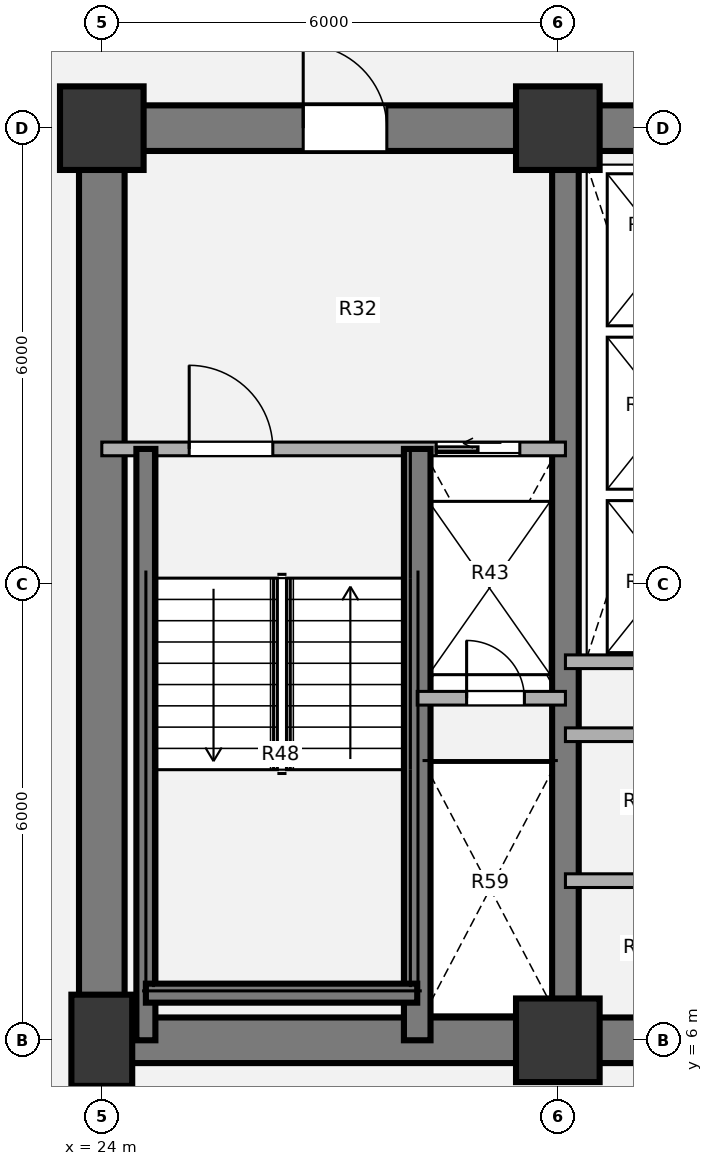
"""IFC4 building model, lengths in metres.
Left out: names, types, materials, properties, quantities, classifications, styles, units other than length and angle.
Written with IfcOpenShell. Run it as: python <this file> out.ifc"""

import sys

from ifc_helpers import new_model, si_unit, direction, frame, frame_2d, origin, origin_2d, place, context, subcontext, project, spatial, rectangle, extrude, source, transform, mapped, element, fill, save


model = new_model("IFC4")
c1 = context("Model", 3, precision=1e-05, world=origin(), true_north=direction((0.0, 1.0)))
c2 = subcontext(c1, "Body", "Model", "MODEL_VIEW")
j1 = project(units=[si_unit("LENGTHUNIT", "METRE"), si_unit("PLANEANGLEUNIT", "RADIAN")], contexts=[c1])
p1 = place(None, origin())
s1 = spatial("IfcSite", under=j1, at=p1, CompositionType="ELEMENT")
p2 = place(p1, origin())
s2 = spatial("IfcBuilding", under=s1, at=p2, CompositionType="ELEMENT")
p3 = place(p2, frame((0.0, 0.0, 68.58)))
s3 = spatial("IfcBuildingStorey", under=s2, at=p3, CompositionType="ELEMENT", Elevation=68.58)
m1 = source(origin(), c2, "Body", "SweptSolid", [
    extrude(rectangle(XDim=0.8, YDim=1.2, at=origin_2d()), origin(), (0.0, 0.0, 1.0), 3.78),
])
p4 = place(p3, frame((24.0, 6.0, 0.0), z_axis=(0.0, 0.0, 1.0), x_axis=(1.0, 0.0, 0.0)))
e1 = element("IfcColumn", 1, at=p4, inside=s3, PredefinedType="COLUMN", context=c2, shape_type="MappedRepresentation", body=[
    mapped(m1, transform((0.0, 0.0, 0.0), x_axis=(1.0, 0.0, 0.0), y_axis=(0.0, 1.0, 0.0), z_axis=(0.0, 0.0, 1.0), scale=1.0)),
])
m2 = source(origin(), c2, "Body", "SweptSolid", [
    extrude(rectangle(XDim=1.1, YDim=1.1, at=origin_2d()), origin(), (0.0, 0.0, 1.0), 3.78),
])
for number, where, z_axis, x_axis in (
    (2, (30.0, 6.0, 0.0), (0.0, 0.0, 1.0), (1.0, 0.0, 0.0)),
    (3, (24.0, 18.0, 0.0), (0.0, 0.0, 1.0), (1.0, 0.0, 0.0)),
    (4, (30.0, 18.0, 0.0), (0.0, 0.0, 1.0), (1.0, 0.0, 0.0)),
):
    element("IfcColumn", number, at=place(p3, frame(where, z_axis=z_axis, x_axis=x_axis)), inside=s3, PredefinedType="COLUMN", context=c2, shape_type="MappedRepresentation", body=[
        mapped(m2, transform((0.0, 0.0, 0.0), x_axis=(1.0, 0.0, 0.0), y_axis=(0.0, 1.0, 0.0), z_axis=(0.0, 0.0, 1.0), scale=1.0)),
    ])
p5 = place(p3, frame((48.3, 6.0, 0.0), z_axis=(0.0, 0.0, 1.0), x_axis=(-1.0, 0.0, 0.0)))
e5 = element("IfcWall", 5, at=p5, inside=s3, PredefinedType="SHEAR", context=c2, shape_type="SweptSolid", body=[
    extrude(rectangle(XDim=24.6, YDim=0.6, at=frame_2d((12.3, 0.0))), origin(), (0.0, 0.0, 1.0), 3.78),
])
p6 = place(p3, frame((24.0, 6.0, 0.0), z_axis=(0.0, 0.0, 1.0), x_axis=(0.0, 1.0, 0.0)))
e6 = element("IfcWall", 6, at=p6, inside=s3, PredefinedType="SHEAR", context=c2, shape_type="SweptSolid", body=[
    extrude(rectangle(XDim=12.0, YDim=0.6, at=frame_2d((6.0, 0.0))), origin(), (0.0, 0.0, 1.0), 3.78),
])
p7 = place(p3, frame((23.7, 18.0, 0.0), z_axis=(0.0, 0.0, 1.0), x_axis=(1.0, 0.0, 0.0)))
e7 = element("IfcWall", 7, at=p7, inside=s3, PredefinedType="SHEAR", context=c2, shape_type="SweptSolid", body=[
    extrude(rectangle(XDim=9.5, YDim=0.6, at=frame_2d((4.75, 0.0))), origin(), (0.0, 0.0, 1.0), 3.78),
])
p8 = place(p7, frame((2.95, 0.0, 0.0)))
e8 = element("IfcOpeningElement", 8, at=p8, cuts=e7, PredefinedType="OPENING", context=c2, shape_type="SweptSolid", body=[
    extrude(rectangle(XDim=1.1, YDim=2.1, at=origin_2d()), frame((0.55, 0.31, 1.05), z_axis=(0.0, -1.0, 0.0), x_axis=(1.0, 0.0, 0.0)), (0.0, 0.0, 1.0), 0.62),
])
p9 = place(p3, frame((30.1, 6.0, 0.0), z_axis=(0.0, 0.0, 1.0), x_axis=(0.0, 1.0, 0.0)))
e9 = element("IfcWall", 9, at=p9, inside=s3, PredefinedType="SHEAR", context=c2, shape_type="SweptSolid", body=[
    extrude(rectangle(XDim=12.0, YDim=0.35, at=frame_2d((6.0, 0.0))), origin(), (0.0, 0.0, 1.0), 3.78),
])
for number, where, z_axis, x_axis in (
    (10, (30.1, 10.98, 0.0), (0.0, 0.0, 1.0), (1.0, 0.0, 0.0)),
    (11, (30.1, 8.1, 0.0), (0.0, 0.0, 1.0), (1.0, 0.0, 0.0)),
    (12, (30.1, 10.02, 0.0), (0.0, 0.0, 1.0), (1.0, 0.0, 0.0)),
):
    element("IfcWall", number, at=place(p3, frame(where, z_axis=z_axis, x_axis=x_axis)), inside=s3, PredefinedType="PARTITIONING", context=c2, shape_type="SweptSolid", body=[
        extrude(rectangle(XDim=2.5, YDim=0.18, at=frame_2d((1.25, 0.0))), origin(), (0.0, 0.0, 1.0), 3.5),
    ])
p10 = place(p3, frame((24.0, 13.78, 0.0), z_axis=(0.0, 0.0, 1.0), x_axis=(1.0, 0.0, 0.0)))
e13 = element("IfcWall", 13, at=p10, inside=s3, PredefinedType="PARTITIONING", context=c2, shape_type="SweptSolid", body=[
    extrude(rectangle(XDim=6.1, YDim=0.18, at=frame_2d((3.05, 0.0))), origin(), (0.0, 0.0, 1.0), 3.5),
])
p11 = place(p10, frame((1.15, 0.0, 0.0)))
e14 = element("IfcOpeningElement", 14, at=p11, cuts=e13, PredefinedType="OPENING", context=c2, shape_type="SweptSolid", body=[
    extrude(rectangle(XDim=1.1, YDim=2.1, at=origin_2d()), frame((0.55, 0.1, 1.05), z_axis=(0.0, -1.0, 0.0), x_axis=(1.0, 0.0, 0.0)), (0.0, 0.0, 1.0), 0.2),
])
p12 = place(p10, frame((4.4, 0.0, 0.0)))
e15 = element("IfcOpeningElement", 15, at=p12, cuts=e13, PredefinedType="OPENING", context=c2, shape_type="SweptSolid", body=[
    extrude(rectangle(XDim=1.1, YDim=2.1, at=origin_2d()), frame((0.55, 0.1, 1.05), z_axis=(0.0, -1.0, 0.0), x_axis=(1.0, 0.0, 0.0)), (0.0, 0.0, 1.0), 0.2),
])
p13 = place(p3, frame((28.15, 6.0, 0.0), z_axis=(0.0, 0.0, 1.0), x_axis=(0.0, 1.0, 0.0)))
e16 = element("IfcWall", 16, at=p13, inside=s3, PredefinedType="SHEAR", context=c2, shape_type="SweptSolid", body=[
    extrude(rectangle(XDim=7.78, YDim=0.35, at=frame_2d((3.89, 0.0))), origin(), (0.0, 0.0, 1.0), 3.85),
])
p14 = place(p3, frame((24.58, 6.0, 0.0), z_axis=(0.0, 0.0, 1.0), x_axis=(0.0, 1.0, 0.0)))
e17 = element("IfcWall", 17, at=p14, inside=s3, PredefinedType="SHEAR", context=c2, shape_type="SweptSolid", body=[
    extrude(rectangle(XDim=7.78, YDim=0.25, at=frame_2d((3.89, 0.0))), origin(), (0.0, 0.0, 1.0), 3.85),
])
p15 = place(p3, frame((24.58, 6.62, 0.0), z_axis=(0.0, 0.0, 1.0), x_axis=(1.0, 0.0, 0.0)))
e18 = element("IfcWall", 18, at=p15, inside=s3, PredefinedType="SHEAR", context=c2, shape_type="SweptSolid", body=[
    extrude(rectangle(XDim=3.57, YDim=0.25, at=frame_2d((1.785, 0.0))), origin(), (0.0, 0.0, 1.0), 3.85),
])
p16 = place(p3, frame((28.15, 10.5, 0.0), z_axis=(0.0, 0.0, 1.0), x_axis=(1.0, 0.0, 0.0)))
e19 = element("IfcWall", 19, at=p16, inside=s3, PredefinedType="PARTITIONING", context=c2, shape_type="SweptSolid", body=[
    extrude(rectangle(XDim=1.95, YDim=0.18, at=frame_2d((0.975, 0.0))), origin(), (0.0, 0.0, 1.0), 3.5),
])
p17 = place(p16, frame((0.65, 0.0, 0.0)))
e20 = element("IfcOpeningElement", 20, at=p17, cuts=e19, PredefinedType="OPENING", context=c2, shape_type="SweptSolid", body=[
    extrude(rectangle(XDim=0.76, YDim=2.05, at=origin_2d()), frame((0.38, 0.1, 1.025), z_axis=(0.0, -1.0, 0.0), x_axis=(1.0, 0.0, 0.0)), (0.0, 0.0, 1.0), 0.2),
])
m3 = source(origin(), c2, "Body", "SweptSolid", [
    extrude(rectangle(XDim=1.1, YDim=2.1, at=origin_2d()), frame((0.55, 0.025, 1.05), z_axis=(0.0, -1.0, 0.0), x_axis=(1.0, 0.0, 0.0)), (0.0, 0.0, 1.0), 0.05),
])
p18 = place(p11, origin())
e21 = element("IfcDoor", 21, at=p18, inside=s3, OperationType="SINGLE_SWING_LEFT", PredefinedType="DOOR", context=c2, shape_type="MappedRepresentation", body=[
    mapped(m3, transform((0.0, 0.0, 0.0), x_axis=(1.0, 0.0, 0.0), y_axis=(0.0, 1.0, 0.0), z_axis=(0.0, 0.0, 1.0), scale=1.0)),
])
fill(e14, e21)
m4 = source(origin(), c2, "Body", "SweptSolid", [
    extrude(rectangle(XDim=1.1, YDim=2.1, at=origin_2d()), frame((0.55, 0.025, 1.05), z_axis=(0.0, -1.0, 0.0), x_axis=(1.0, 0.0, 0.0)), (0.0, 0.0, 1.0), 0.05),
])
p19 = place(p12, origin())
e22 = element("IfcDoor", 22, at=p19, inside=s3, OperationType="SLIDING_TO_LEFT", PredefinedType="DOOR", context=c2, shape_type="MappedRepresentation", body=[
    mapped(m4, transform((0.0, 0.0, 0.0), x_axis=(1.0, 0.0, 0.0), y_axis=(0.0, 1.0, 0.0), z_axis=(0.0, 0.0, 1.0), scale=1.0)),
])
fill(e15, e22)
m5 = source(origin(), c2, "Body", "SweptSolid", [
    extrude(rectangle(XDim=0.76, YDim=2.05, at=origin_2d()), frame((0.38, 0.025, 1.025), z_axis=(0.0, -1.0, 0.0), x_axis=(1.0, 0.0, 0.0)), (0.0, 0.0, 1.0), 0.05),
])
p20 = place(p17, origin())
e23 = element("IfcDoor", 23, at=p20, inside=s3, OperationType="SINGLE_SWING_LEFT", PredefinedType="DOOR", context=c2, shape_type="MappedRepresentation", body=[
    mapped(m5, transform((0.0, 0.0, 0.0), x_axis=(1.0, 0.0, 0.0), y_axis=(0.0, 1.0, 0.0), z_axis=(0.0, 0.0, 1.0), scale=1.0)),
])
fill(e20, e23)
m6 = source(origin(), c2, "Body", "SweptSolid", [
    extrude(rectangle(XDim=1.1, YDim=2.1, at=origin_2d()), frame((0.55, 0.025, 1.05), z_axis=(0.0, -1.0, 0.0), x_axis=(1.0, 0.0, 0.0)), (0.0, 0.0, 1.0), 0.05),
])
p21 = place(p8, origin())
e24 = element("IfcDoor", 24, at=p21, inside=s3, OperationType="SINGLE_SWING_LEFT", PredefinedType="DOOR", context=c2, shape_type="MappedRepresentation", body=[
    mapped(m6, transform((0.0, 0.0, 0.0), x_axis=(1.0, 0.0, 0.0), y_axis=(0.0, 1.0, 0.0), z_axis=(0.0, 0.0, 1.0), scale=1.0)),
])
fill(e8, e24)
save(model, sys.argv[1])
